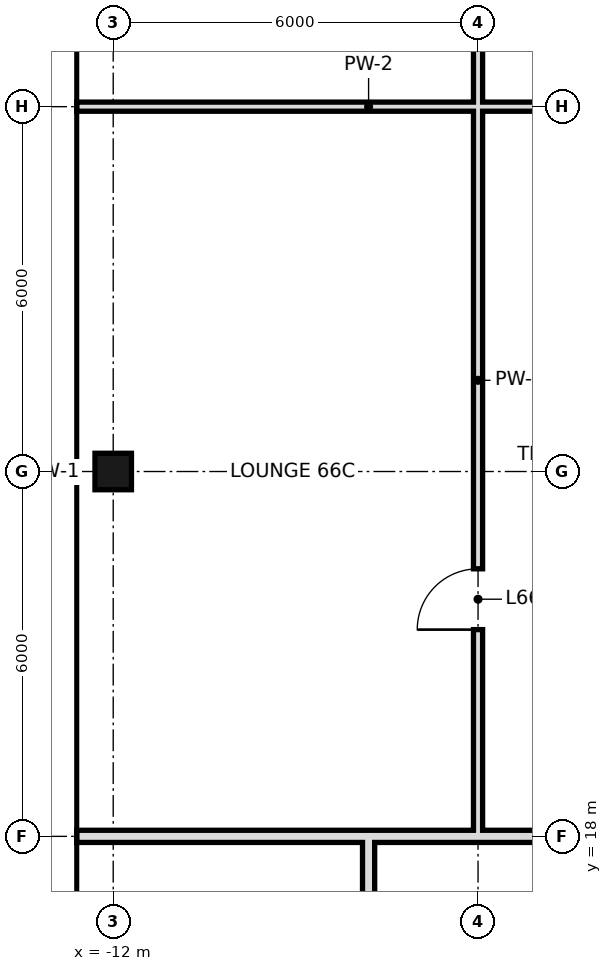
"""IFC4 building model, lengths in metres.
Left out: names, types, materials, properties, quantities, classifications, styles, units other than length and angle.
Written with IfcOpenShell. Run it as: python <this file> out.ifc"""

import sys

from ifc_helpers import new_model, si_unit, direction, frame, frame_2d, origin, origin_2d, place, context, subcontext, project, spatial, rectangle, hollow_rectangle, extrude, element, fill, save


model = new_model("IFC4")
c1 = context("Model", 3, precision=1e-05, world=origin(), true_north=direction((0.0, 1.0)))
c2 = subcontext(c1, "Body", "Model", "MODEL_VIEW")
j1 = project(units=[si_unit("LENGTHUNIT", "METRE"), si_unit("PLANEANGLEUNIT", "RADIAN")], contexts=[c1])
p1 = place(None, origin())
s1 = spatial("IfcSite", under=j1, at=p1, CompositionType="ELEMENT")
p2 = place(p1, origin())
s2 = spatial("IfcBuilding", under=s1, at=p2, CompositionType="ELEMENT")
p3 = place(p2, frame((0.0, 0.0, 277.4)))
s3 = spatial("IfcBuildingStorey", under=s2, at=p3, CompositionType="ELEMENT", Elevation=277.4)
p4 = place(p3, frame((-12.0, 24.0, 0.0), z_axis=(0.0, 0.0, 1.0), x_axis=(1.0, 0.0, 0.0)))
e1 = element("IfcColumn", 1, at=p4, inside=s3, PredefinedType="COLUMN", context=c2, shape_type="SweptSolid", body=[
    extrude(hollow_rectangle(XDim=0.6, YDim=0.6, WallThickness=0.028, at=origin_2d()), origin(), (0.0, 0.0, 1.0), 4.4),
])
p5 = place(p3, frame((-6.0, 18.0, 0.0), z_axis=(0.0, 0.0, 1.0), x_axis=(0.0, 1.0, 0.0)))
e2 = element("IfcWall", 2, at=p5, inside=s3, PredefinedType="PARTITIONING", context=c2, shape_type="SweptSolid", body=[
    extrude(rectangle(XDim=15.0, YDim=0.15, at=frame_2d((7.5, 0.0))), origin(), (0.0, 0.0, 1.0), 4.1),
])
p6 = place(p5, frame((3.4, 0.0, 0.0)))
e3 = element("IfcOpeningElement", 3, at=p6, cuts=e2, PredefinedType="OPENING", context=c2, shape_type="SweptSolid", body=[
    extrude(rectangle(XDim=1.0, YDim=2.4, at=frame_2d((0.5, 1.2))), frame((0.0, 0.085, 0.0), z_axis=(0.0, -1.0, 0.0), x_axis=(1.0, 0.0, 0.0)), (0.0, 0.0, 1.0), 0.17),
])
p7 = place(p5, frame((13.0, 0.0, 0.0)))
e4 = element("IfcOpeningElement", 4, at=p7, cuts=e2, PredefinedType="OPENING", context=c2, shape_type="SweptSolid", body=[
    extrude(rectangle(XDim=1.0, YDim=2.4, at=frame_2d((0.5, 1.2))), frame((0.0, 0.085, 0.0), z_axis=(0.0, -1.0, 0.0), x_axis=(1.0, 0.0, 0.0)), (0.0, 0.0, 1.0), 0.17),
])
p8 = place(p3, frame((-7.8, 10.8, 0.0), z_axis=(0.0, 0.0, 1.0), x_axis=(0.0, 1.0, 0.0)))
e5 = element("IfcWall", 5, at=p8, inside=s3, PredefinedType="SOLIDWALL", context=c2, shape_type="SweptSolid", body=[
    extrude(rectangle(XDim=7.2, YDim=0.2, at=frame_2d((3.6, 0.0))), origin(), (0.0, 0.0, 1.0), 3.4),
])
p9 = place(p3, frame((-12.6, 18.0, 0.0), z_axis=(0.0, 0.0, 1.0), x_axis=(1.0, 0.0, 0.0)))
e6 = element("IfcWall", 6, at=p9, inside=s3, PredefinedType="SOLIDWALL", context=c2, shape_type="SweptSolid", body=[
    extrude(rectangle(XDim=4.8, YDim=0.2, at=frame_2d((2.4, 0.0))), origin(), (0.0, 0.0, 1.0), 3.4),
])
p10 = place(p3, frame((-7.8, 18.0, 0.0), z_axis=(0.0, 0.0, 1.0), x_axis=(1.0, 0.0, 0.0)))
e7 = element("IfcWall", 7, at=p10, inside=s3, PredefinedType="SOLIDWALL", context=c2, shape_type="SweptSolid", body=[
    extrude(rectangle(XDim=10.9, YDim=0.2, at=frame_2d((5.45, 0.0))), origin(), (0.0, 0.0, 1.0), 3.4),
])
p11 = place(p3, frame((-12.6, 30.0, 0.0), z_axis=(0.0, 0.0, 1.0), x_axis=(1.0, 0.0, 0.0)))
e8 = element("IfcWall", 8, at=p11, inside=s3, PredefinedType="PARTITIONING", context=c2, shape_type="SweptSolid", body=[
    extrude(rectangle(XDim=9.6, YDim=0.15, at=frame_2d((4.8, 0.0))), origin(), (0.0, 0.0, 1.0), 3.4),
])
p12 = place(p6, origin())
e9 = element("IfcDoor", 9, at=p12, inside=s3, OperationType="SINGLE_SWING_LEFT", PredefinedType="DOOR", context=c2, shape_type="SweptSolid", body=[
    extrude(rectangle(XDim=1.0, YDim=2.4, at=frame_2d((0.5, 1.2))), frame((0.0, 0.025, 0.0), z_axis=(0.0, -1.0, 0.0), x_axis=(1.0, 0.0, 0.0)), (0.0, 0.0, 1.0), 0.05),
])
fill(e3, e9)
save(model, sys.argv[1])
